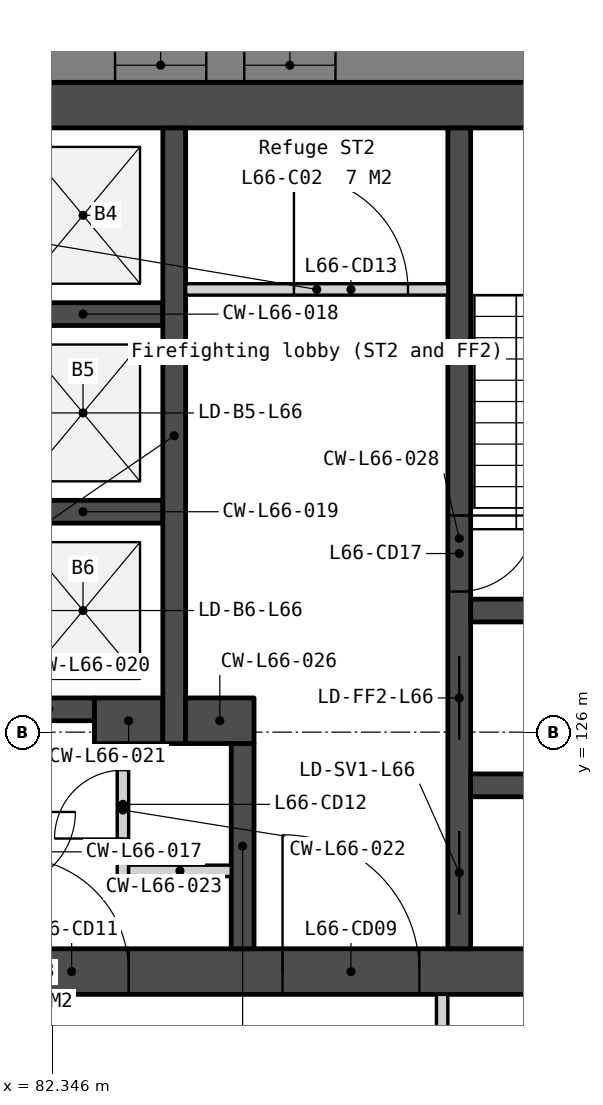
"""IFC4 building model, lengths in metres.
Left out: names, types, materials, properties, quantities, classifications, styles, units other than length and angle.
Written with IfcOpenShell. Run it as: python <this file> out.ifc"""

import sys

from ifc_helpers import new_model, si_unit, direction, frame, frame_2d, origin, place, context, subcontext, project, spatial, polyline, rectangle, outline, extrude, element, fill, save


model = new_model("IFC4")
c1 = context("Model", 3, precision=1e-05, world=origin(), true_north=direction((0.0, 1.0)))
c2 = subcontext(c1, "Body", "Model", "MODEL_VIEW")
j1 = project(units=[si_unit("LENGTHUNIT", "METRE"), si_unit("PLANEANGLEUNIT", "RADIAN")], contexts=[c1])
p1 = place(None, origin())
s1 = spatial("IfcSite", under=j1, at=p1, CompositionType="ELEMENT")
p2 = place(p1, origin())
s2 = spatial("IfcBuilding", under=s1, at=p2, CompositionType="ELEMENT")
p3 = place(p2, frame((0.0, 0.0, 269.9)))
s3 = spatial("IfcBuildingStorey", under=s2, at=p3, CompositionType="ELEMENT", Elevation=269.9)
p4 = place(p3, frame((69.0, 134.25, 0.0), z_axis=(0.0, 0.0, 1.0), x_axis=(1.0, 0.0, 0.0)))
e1 = element("IfcWall", 1, at=p4, inside=s3, PredefinedType="SOLIDWALL", context=c2, shape_type="SweptSolid", body=[
    extrude(rectangle(XDim=22.0, YDim=0.6, at=frame_2d((11.0, 0.0))), origin(), (0.0, 0.0, 1.0), 3.75),
])
p5 = place(p3, frame((69.0, 122.85, 0.0), z_axis=(0.0, 0.0, 1.0), x_axis=(1.0, 0.0, 0.0)))
e2 = element("IfcWall", 2, at=p5, inside=s3, PredefinedType="SOLIDWALL", context=c2, shape_type="SweptSolid", body=[
    extrude(rectangle(XDim=22.0, YDim=0.6, at=frame_2d((11.0, 0.0))), origin(), (0.0, 0.0, 1.0), 3.75),
])
p6 = place(p5, frame((16.375, 0.0, 0.0)))
e3 = element("IfcOpeningElement", 3, at=p6, cuts=e2, PredefinedType="OPENING", context=c2, shape_type="SweptSolid", body=[
    extrude(rectangle(XDim=1.8, YDim=2.1, at=frame_2d((0.9, 1.05))), frame((0.0, 0.31, 0.0), z_axis=(0.0, -1.0, 0.0), x_axis=(1.0, 0.0, 0.0)), (0.0, 0.0, 1.0), 0.62),
])
p7 = place(p5, frame((3.825, 0.0, 0.0)))
e4 = element("IfcOpeningElement", 4, at=p7, cuts=e2, PredefinedType="OPENING", context=c2, shape_type="SweptSolid", body=[
    extrude(rectangle(XDim=1.8, YDim=2.1, at=frame_2d((0.9, 1.05))), frame((0.0, 0.31, 0.0), z_axis=(0.0, -1.0, 0.0), x_axis=(1.0, 0.0, 0.0)), (0.0, 0.0, 1.0), 0.62),
])
p8 = place(p5, frame((12.85, 0.0, 0.0)))
e5 = element("IfcOpeningElement", 5, at=p8, cuts=e2, PredefinedType="OPENING", context=c2, shape_type="SweptSolid", body=[
    extrude(rectangle(XDim=1.5, YDim=2.1, at=frame_2d((0.75, 1.05))), frame((0.0, 0.31, 0.0), z_axis=(0.0, -1.0, 0.0), x_axis=(1.0, 0.0, 0.0)), (0.0, 0.0, 1.0), 0.62),
])
for number, where, z_axis, x_axis in (
    (6, (81.7, 131.5, 0.0), (0.0, 0.0, 1.0), (1.0, 0.0, 0.0)),
    (7, (81.7, 128.9, 0.0), (0.0, 0.0, 1.0), (1.0, 0.0, 0.0)),
):
    element("IfcWall", number, at=place(p3, frame(where, z_axis=z_axis, x_axis=x_axis)), inside=s3, PredefinedType="SOLIDWALL", context=c2, shape_type="SweptSolid", body=[
        extrude(rectangle(XDim=2.1, YDim=0.3, at=frame_2d((1.05, 0.0))), origin(), (0.0, 0.0, 1.0), 3.75),
    ])
p9 = place(p3, frame((81.7, 126.3, 0.0), z_axis=(0.0, 0.0, 1.0), x_axis=(1.0, 0.0, 0.0)))
e8 = element("IfcWall", 8, at=p9, inside=s3, PredefinedType="SOLIDWALL", context=c2, shape_type="SweptSolid", body=[
    extrude(rectangle(XDim=1.2, YDim=0.3, at=frame_2d((0.6, 0.0))), origin(), (0.0, 0.0, 1.0), 3.75),
])
p10 = place(p3, frame((82.9, 126.15, 0.0), z_axis=(0.0, 0.0, 1.0), x_axis=(1.0, 0.0, 0.0)))
e9 = element("IfcWall", 9, at=p10, inside=s3, PredefinedType="SOLIDWALL", context=c2, shape_type="SweptSolid", body=[
    extrude(rectangle(XDim=0.9, YDim=0.6, at=frame_2d((0.45, 0.0))), origin(), (0.0, 0.0, 1.0), 3.75),
])
p11 = place(p3, frame((83.275, 125.85, 0.0), z_axis=(0.0, 0.0, 1.0), x_axis=(0.0, -1.0, 0.0)))
e10 = element("IfcWall", 10, at=p11, inside=s3, PredefinedType="PARTITIONING", context=c2, shape_type="SweptSolid", body=[
    extrude(rectangle(XDim=1.75, YDim=0.15, at=frame_2d((0.875, 0.0))), origin(), (0.0, 0.0, 1.0), 3.75),
])
p12 = place(p11, frame((0.35, 0.0, 0.0)))
e11 = element("IfcOpeningElement", 11, at=p12, cuts=e10, PredefinedType="OPENING", context=c2, shape_type="SweptSolid", body=[
    extrude(rectangle(XDim=0.9, YDim=2.1, at=frame_2d((0.45, 1.05))), frame((0.0, 0.085, 0.0), z_axis=(0.0, -1.0, 0.0), x_axis=(1.0, 0.0, 0.0)), (0.0, 0.0, 1.0), 0.17),
])
p13 = place(p3, frame((83.35, 124.175, 0.0), z_axis=(0.0, 0.0, 1.0), x_axis=(1.0, 0.0, 0.0)))
e12 = element("IfcWall", 12, at=p13, inside=s3, PredefinedType="PARTITIONING", context=c2, shape_type="SweptSolid", body=[
    extrude(rectangle(XDim=1.35, YDim=0.15, at=frame_2d((0.675, 0.0))), origin(), (0.0, 0.0, 1.0), 3.75),
])
p14 = place(p3, frame((83.95, 133.95, 0.0), z_axis=(0.0, 0.0, 1.0), x_axis=(0.0, -1.0, 0.0)))
e13 = element("IfcWall", 13, at=p14, inside=s3, PredefinedType="SOLIDWALL", context=c2, shape_type="SweptSolid", body=[
    extrude(rectangle(XDim=8.1, YDim=0.3, at=frame_2d((4.05, 0.0))), origin(), (0.0, 0.0, 1.0), 3.75),
])
p15 = place(p3, frame((84.1, 131.825, 0.0), z_axis=(0.0, 0.0, 1.0), x_axis=(1.0, 0.0, 0.0)))
e14 = element("IfcWall", 14, at=p15, inside=s3, PredefinedType="PARTITIONING", context=c2, shape_type="SweptSolid", body=[
    extrude(rectangle(XDim=3.45, YDim=0.15, at=frame_2d((1.725, 0.0))), origin(), (0.0, 0.0, 1.0), 3.75),
])
p16 = place(p15, frame((1.425, 0.0, 0.0)))
e15 = element("IfcOpeningElement", 15, at=p16, cuts=e14, PredefinedType="OPENING", context=c2, shape_type="SweptSolid", body=[
    extrude(rectangle(XDim=1.5, YDim=2.1, at=frame_2d((0.75, 1.05))), frame((0.0, 0.085, 0.0), z_axis=(0.0, -1.0, 0.0), x_axis=(1.0, 0.0, 0.0)), (0.0, 0.0, 1.0), 0.17),
])
p17 = place(p3, frame((84.1, 126.15, 0.0), z_axis=(0.0, 0.0, 1.0), x_axis=(1.0, 0.0, 0.0)))
e16 = element("IfcWall", 16, at=p17, inside=s3, PredefinedType="SOLIDWALL", context=c2, shape_type="SweptSolid", body=[
    extrude(rectangle(XDim=0.9, YDim=0.6, at=frame_2d((0.45, 0.0))), origin(), (0.0, 0.0, 1.0), 3.75),
])
p18 = place(p3, frame((84.85, 125.85, 0.0), z_axis=(0.0, 0.0, 1.0), x_axis=(0.0, -1.0, 0.0)))
e17 = element("IfcWall", 17, at=p18, inside=s3, PredefinedType="SOLIDWALL", context=c2, shape_type="SweptSolid", body=[
    extrude(rectangle(XDim=2.7, YDim=0.3, at=frame_2d((1.35, 0.0))), origin(), (0.0, 0.0, 1.0), 3.75),
])
p19 = place(p3, frame((87.7, 133.95, 0.0), z_axis=(0.0, 0.0, 1.0), x_axis=(0.0, -1.0, 0.0)))
e18 = element("IfcWall", 18, at=p19, inside=s3, PredefinedType="SOLIDWALL", context=c2, shape_type="SweptSolid", body=[
    extrude(rectangle(XDim=10.8, YDim=0.3, at=frame_2d((5.4, 0.0))), origin(), (0.0, 0.0, 1.0), 3.75),
])
p20 = place(p19, frame((6.95, 0.0, 0.0)))
e19 = element("IfcOpeningElement", 19, at=p20, cuts=e18, PredefinedType="OPENING", context=c2, shape_type="SweptSolid", body=[
    extrude(rectangle(XDim=1.1, YDim=2.1, at=frame_2d((0.55, 1.05))), frame((0.0, 0.16, 0.0), z_axis=(0.0, -1.0, 0.0), x_axis=(1.0, 0.0, 0.0)), (0.0, 0.0, 1.0), 0.32),
])
p21 = place(p19, frame((5.1, 0.0, 0.0)))
e20 = element("IfcOpeningElement", 20, at=p21, cuts=e18, PredefinedType="OPENING", context=c2, shape_type="SweptSolid", body=[
    extrude(rectangle(XDim=1.0, YDim=2.1, at=frame_2d((0.5, 1.05))), frame((0.0, 0.16, 0.0), z_axis=(0.0, -1.0, 0.0), x_axis=(1.0, 0.0, 0.0)), (0.0, 0.0, 1.0), 0.32),
])
p22 = place(p19, frame((9.25, 0.0, 0.0)))
e21 = element("IfcOpeningElement", 21, at=p22, cuts=e18, PredefinedType="OPENING", context=c2, shape_type="SweptSolid", body=[
    extrude(rectangle(XDim=1.1, YDim=2.1, at=frame_2d((0.55, 1.05))), frame((0.0, 0.16, 0.0), z_axis=(0.0, -1.0, 0.0), x_axis=(1.0, 0.0, 0.0)), (0.0, 0.0, 1.0), 0.32),
])
for number, where, z_axis, x_axis in (
    (22, (87.85, 127.6, 0.0), (0.0, 0.0, 1.0), (1.0, 0.0, 0.0)),
    (23, (87.85, 125.3, 0.0), (0.0, 0.0, 1.0), (1.0, 0.0, 0.0)),
):
    element("IfcWall", number, at=place(p3, frame(where, z_axis=z_axis, x_axis=x_axis)), inside=s3, PredefinedType="SOLIDWALL", context=c2, shape_type="SweptSolid", body=[
        extrude(rectangle(XDim=2.55, YDim=0.3, at=frame_2d((1.275, 0.0))), origin(), (0.0, 0.0, 1.0), 3.75),
    ])
p23 = place(p3, frame((98.486, 134.775, -0.15), z_axis=(0.0, 0.0, 1.0), x_axis=(-1.0, 0.0, 0.0)))
e24 = element("IfcWall", 24, at=p23, inside=s3, PredefinedType="SOLIDWALL", context=c2, shape_type="SweptSolid", body=[
    extrude(outline(polyline([(36.972, 0.0), (36.972, 3.9), (0.0, 3.9), (0.0, 0.0), (36.972, 0.0)])), frame((0.0, 0.225, 0.0), z_axis=(0.0, -1.0, 0.0), x_axis=(1.0, 0.0, 0.0)), (0.0, 0.0, 1.0), 0.45),
])
p24 = place(p23, frame((3.172, 0.0, 0.95)))
e25 = element("IfcOpeningElement", 25, at=p24, cuts=e24, PredefinedType="OPENING", context=c2, shape_type="SweptSolid", body=[
    extrude(rectangle(XDim=1.2, YDim=2.2, at=frame_2d((0.6, 1.1))), frame((0.0, 0.235, 0.0), z_axis=(0.0, -1.0, 0.0), x_axis=(1.0, 0.0, 0.0)), (0.0, 0.0, 1.0), 0.47),
])
p25 = place(p23, frame((4.872, 0.0, 0.95)))
e26 = element("IfcOpeningElement", 26, at=p25, cuts=e24, PredefinedType="OPENING", context=c2, shape_type="SweptSolid", body=[
    extrude(rectangle(XDim=1.2, YDim=2.2, at=frame_2d((0.6, 1.1))), frame((0.0, 0.235, 0.0), z_axis=(0.0, -1.0, 0.0), x_axis=(1.0, 0.0, 0.0)), (0.0, 0.0, 1.0), 0.47),
])
p26 = place(p23, frame((12.415, 0.0, 0.95)))
e27 = element("IfcOpeningElement", 27, at=p26, cuts=e24, PredefinedType="OPENING", context=c2, shape_type="SweptSolid", body=[
    extrude(rectangle(XDim=1.2, YDim=2.2, at=frame_2d((0.6, 1.1))), frame((0.0, 0.235, 0.0), z_axis=(0.0, -1.0, 0.0), x_axis=(1.0, 0.0, 0.0)), (0.0, 0.0, 1.0), 0.47),
])
p27 = place(p23, frame((14.115, 0.0, 0.95)))
e28 = element("IfcOpeningElement", 28, at=p27, cuts=e24, PredefinedType="OPENING", context=c2, shape_type="SweptSolid", body=[
    extrude(rectangle(XDim=1.2, YDim=2.2, at=frame_2d((0.6, 1.1))), frame((0.0, 0.235, 0.0), z_axis=(0.0, -1.0, 0.0), x_axis=(1.0, 0.0, 0.0)), (0.0, 0.0, 1.0), 0.47),
])
p28 = place(p23, frame((21.658, 0.0, 0.95)))
e29 = element("IfcOpeningElement", 29, at=p28, cuts=e24, PredefinedType="OPENING", context=c2, shape_type="SweptSolid", body=[
    extrude(rectangle(XDim=1.2, YDim=2.2, at=frame_2d((0.6, 1.1))), frame((0.0, 0.235, 0.0), z_axis=(0.0, -1.0, 0.0), x_axis=(1.0, 0.0, 0.0)), (0.0, 0.0, 1.0), 0.47),
])
p29 = place(p23, frame((23.358, 0.0, 0.95)))
e30 = element("IfcOpeningElement", 30, at=p29, cuts=e24, PredefinedType="OPENING", context=c2, shape_type="SweptSolid", body=[
    extrude(rectangle(XDim=1.2, YDim=2.2, at=frame_2d((0.6, 1.1))), frame((0.0, 0.235, 0.0), z_axis=(0.0, -1.0, 0.0), x_axis=(1.0, 0.0, 0.0)), (0.0, 0.0, 1.0), 0.47),
])
p30 = place(p23, frame((30.901, 0.0, 0.95)))
e31 = element("IfcOpeningElement", 31, at=p30, cuts=e24, PredefinedType="OPENING", context=c2, shape_type="SweptSolid", body=[
    extrude(rectangle(XDim=1.2, YDim=2.2, at=frame_2d((0.6, 1.1))), frame((0.0, 0.235, 0.0), z_axis=(0.0, -1.0, 0.0), x_axis=(1.0, 0.0, 0.0)), (0.0, 0.0, 1.0), 0.47),
])
p31 = place(p23, frame((32.601, 0.0, 0.95)))
e32 = element("IfcOpeningElement", 32, at=p31, cuts=e24, PredefinedType="OPENING", context=c2, shape_type="SweptSolid", body=[
    extrude(rectangle(XDim=1.2, YDim=2.2, at=frame_2d((0.6, 1.1))), frame((0.0, 0.235, 0.0), z_axis=(0.0, -1.0, 0.0), x_axis=(1.0, 0.0, 0.0)), (0.0, 0.0, 1.0), 0.47),
])
p32 = place(p3, frame((80.905, 101.188, -0.15), z_axis=(0.0, 0.0, 1.0), x_axis=(0.500002536638, 0.866023939251, 0.0)))
e33 = element("IfcWall", 33, at=p32, inside=s3, PredefinedType="SOLIDWALL", context=c2, shape_type="SweptSolid", body=[
    extrude(outline(polyline([(36.972, 0.0), (36.972, 3.9), (0.0, 3.9), (0.0, 0.0), (36.972, 0.0)])), frame((0.0, 0.225, 0.0), z_axis=(0.0, -1.0, 0.0), x_axis=(1.0, 0.0, 0.0)), (0.0, 0.0, 1.0), 0.45),
])
p33 = place(p32, frame((3.172, 0.0, 0.95)))
e34 = element("IfcOpeningElement", 34, at=p33, cuts=e33, PredefinedType="OPENING", context=c2, shape_type="SweptSolid", body=[
    extrude(rectangle(XDim=1.2, YDim=2.2, at=frame_2d((0.6, 1.1))), frame((0.0, 0.235, 0.0), z_axis=(0.0, -1.0, 0.0), x_axis=(1.0, 0.0, 0.0)), (0.0, 0.0, 1.0), 0.47),
])
p34 = place(p32, frame((4.872, 0.0, 0.95)))
e35 = element("IfcOpeningElement", 35, at=p34, cuts=e33, PredefinedType="OPENING", context=c2, shape_type="SweptSolid", body=[
    extrude(rectangle(XDim=1.2, YDim=2.2, at=frame_2d((0.6, 1.1))), frame((0.0, 0.235, 0.0), z_axis=(0.0, -1.0, 0.0), x_axis=(1.0, 0.0, 0.0)), (0.0, 0.0, 1.0), 0.47),
])
p35 = place(p32, frame((12.415, 0.0, 0.95)))
e36 = element("IfcOpeningElement", 36, at=p35, cuts=e33, PredefinedType="OPENING", context=c2, shape_type="SweptSolid", body=[
    extrude(rectangle(XDim=1.2, YDim=2.2, at=frame_2d((0.6, 1.1))), frame((0.0, 0.235, 0.0), z_axis=(0.0, -1.0, 0.0), x_axis=(1.0, 0.0, 0.0)), (0.0, 0.0, 1.0), 0.47),
])
p36 = place(p32, frame((14.115, 0.0, 0.95)))
e37 = element("IfcOpeningElement", 37, at=p36, cuts=e33, PredefinedType="OPENING", context=c2, shape_type="SweptSolid", body=[
    extrude(rectangle(XDim=1.2, YDim=2.2, at=frame_2d((0.6, 1.1))), frame((0.0, 0.235, 0.0), z_axis=(0.0, -1.0, 0.0), x_axis=(1.0, 0.0, 0.0)), (0.0, 0.0, 1.0), 0.47),
])
p37 = place(p32, frame((21.658, 0.0, 0.95)))
e38 = element("IfcOpeningElement", 38, at=p37, cuts=e33, PredefinedType="OPENING", context=c2, shape_type="SweptSolid", body=[
    extrude(rectangle(XDim=1.2, YDim=2.2, at=frame_2d((0.6, 1.1))), frame((0.0, 0.235, 0.0), z_axis=(0.0, -1.0, 0.0), x_axis=(1.0, 0.0, 0.0)), (0.0, 0.0, 1.0), 0.47),
])
p38 = place(p32, frame((23.358, 0.0, 0.95)))
e39 = element("IfcOpeningElement", 39, at=p38, cuts=e33, PredefinedType="OPENING", context=c2, shape_type="SweptSolid", body=[
    extrude(rectangle(XDim=1.2, YDim=2.2, at=frame_2d((0.6, 1.1))), frame((0.0, 0.235, 0.0), z_axis=(0.0, -1.0, 0.0), x_axis=(1.0, 0.0, 0.0)), (0.0, 0.0, 1.0), 0.47),
])
p39 = place(p32, frame((30.901, 0.0, 0.95)))
e40 = element("IfcOpeningElement", 40, at=p39, cuts=e33, PredefinedType="OPENING", context=c2, shape_type="SweptSolid", body=[
    extrude(rectangle(XDim=1.2, YDim=2.2, at=frame_2d((0.6, 1.1))), frame((0.0, 0.235, 0.0), z_axis=(0.0, -1.0, 0.0), x_axis=(1.0, 0.0, 0.0)), (0.0, 0.0, 1.0), 0.47),
])
p40 = place(p32, frame((32.601, 0.0, 0.95)))
e41 = element("IfcOpeningElement", 41, at=p40, cuts=e33, PredefinedType="OPENING", context=c2, shape_type="SweptSolid", body=[
    extrude(rectangle(XDim=1.2, YDim=2.2, at=frame_2d((0.6, 1.1))), frame((0.0, 0.235, 0.0), z_axis=(0.0, -1.0, 0.0), x_axis=(1.0, 0.0, 0.0)), (0.0, 0.0, 1.0), 0.47),
])
p41 = place(p3, frame((87.475, 120.025, 0.0), z_axis=(0.0, 0.0, 1.0), x_axis=(9.6693096e-05, 0.999999995325, 0.0)))
e42 = element("IfcWall", 42, at=p41, inside=s3, PredefinedType="PARTITIONING", context=c2, shape_type="SweptSolid", body=[
    extrude(rectangle(XDim=2.525, YDim=0.15, at=frame_2d((1.262, 0.0))), origin(), (0.0, 0.0, 1.0), 3.75),
])
p42 = place(p20, origin())
e43 = element("IfcDoor", 43, at=p42, inside=s3, OperationType="SLIDING_TO_LEFT", PredefinedType="DOOR", context=c2, shape_type="SweptSolid", body=[
    extrude(rectangle(XDim=1.1, YDim=2.1, at=frame_2d((0.55, 1.05))), frame((0.0, 0.025, 0.0), z_axis=(0.0, -1.0, 0.0), x_axis=(1.0, 0.0, 0.0)), (0.0, 0.0, 1.0), 0.05),
])
fill(e19, e43)
p43 = place(p6, origin())
e44 = element("IfcDoor", 44, at=p43, inside=s3, OperationType="DOUBLE_DOOR_DOUBLE_SWING", PredefinedType="DOOR", context=c2, shape_type="SweptSolid", body=[
    extrude(rectangle(XDim=1.8, YDim=2.1, at=frame_2d((0.9, 1.05))), frame((0.0, 0.025, 0.0), z_axis=(0.0, -1.0, 0.0), x_axis=(1.0, 0.0, 0.0)), (0.0, 0.0, 1.0), 0.05),
])
fill(e3, e44)
p44 = place(p8, origin())
e45 = element("IfcDoor", 45, at=p44, inside=s3, OperationType="DOUBLE_DOOR_DOUBLE_SWING", PredefinedType="DOOR", context=c2, shape_type="SweptSolid", body=[
    extrude(rectangle(XDim=1.5, YDim=2.1, at=frame_2d((0.75, 1.05))), frame((0.0, 0.025, 0.0), z_axis=(0.0, -1.0, 0.0), x_axis=(1.0, 0.0, 0.0)), (0.0, 0.0, 1.0), 0.05),
])
fill(e5, e45)
p45 = place(p12, origin())
e46 = element("IfcDoor", 46, at=p45, inside=s3, OperationType="SINGLE_SWING_RIGHT", PredefinedType="DOOR", context=c2, shape_type="SweptSolid", body=[
    extrude(rectangle(XDim=0.9, YDim=2.1, at=frame_2d((0.45, 1.05))), frame((0.0, 0.025, 0.0), z_axis=(0.0, -1.0, 0.0), x_axis=(1.0, 0.0, 0.0)), (0.0, 0.0, 1.0), 0.05),
])
fill(e11, e46)
p46 = place(p16, origin())
e47 = element("IfcDoor", 47, at=p46, inside=s3, OperationType="DOUBLE_DOOR_DOUBLE_SWING", PredefinedType="DOOR", context=c2, shape_type="SweptSolid", body=[
    extrude(rectangle(XDim=1.5, YDim=2.1, at=frame_2d((0.75, 1.05))), frame((0.0, 0.025, 0.0), z_axis=(0.0, -1.0, 0.0), x_axis=(1.0, 0.0, 0.0)), (0.0, 0.0, 1.0), 0.05),
])
fill(e15, e47)
p47 = place(p21, origin())
e48 = element("IfcDoor", 48, at=p47, inside=s3, OperationType="SINGLE_SWING_LEFT", PredefinedType="DOOR", context=c2, shape_type="SweptSolid", body=[
    extrude(rectangle(XDim=1.0, YDim=2.1, at=frame_2d((0.5, 1.05))), frame((0.0, 0.025, 0.0), z_axis=(0.0, -1.0, 0.0), x_axis=(1.0, 0.0, 0.0)), (0.0, 0.0, 1.0), 0.05),
])
fill(e20, e48)
p48 = place(p22, origin())
e49 = element("IfcDoor", 49, at=p48, inside=s3, OperationType="SLIDING_TO_LEFT", PredefinedType="DOOR", context=c2, shape_type="SweptSolid", body=[
    extrude(rectangle(XDim=1.1, YDim=2.1, at=frame_2d((0.55, 1.05))), frame((0.0, 0.025, 0.0), z_axis=(0.0, -1.0, 0.0), x_axis=(1.0, 0.0, 0.0)), (0.0, 0.0, 1.0), 0.05),
])
fill(e21, e49)
p49 = place(p26, origin())
e50 = element("IfcWindow", 50, at=p49, inside=s3, PartitioningType="SINGLE_PANEL", PredefinedType="WINDOW", context=c2, shape_type="SweptSolid", body=[
    extrude(rectangle(XDim=1.2, YDim=2.2, at=frame_2d((0.6, 1.1))), frame((0.0, 0.03, 0.0), z_axis=(0.0, -1.0, 0.0), x_axis=(1.0, 0.0, 0.0)), (0.0, 0.0, 1.0), 0.06),
])
fill(e27, e50)
p50 = place(p27, origin())
e51 = element("IfcWindow", 51, at=p50, inside=s3, PartitioningType="SINGLE_PANEL", PredefinedType="WINDOW", context=c2, shape_type="SweptSolid", body=[
    extrude(rectangle(XDim=1.2, YDim=2.2, at=frame_2d((0.6, 1.1))), frame((0.0, 0.03, 0.0), z_axis=(0.0, -1.0, 0.0), x_axis=(1.0, 0.0, 0.0)), (0.0, 0.0, 1.0), 0.06),
])
fill(e28, e51)
save(model, sys.argv[1])
